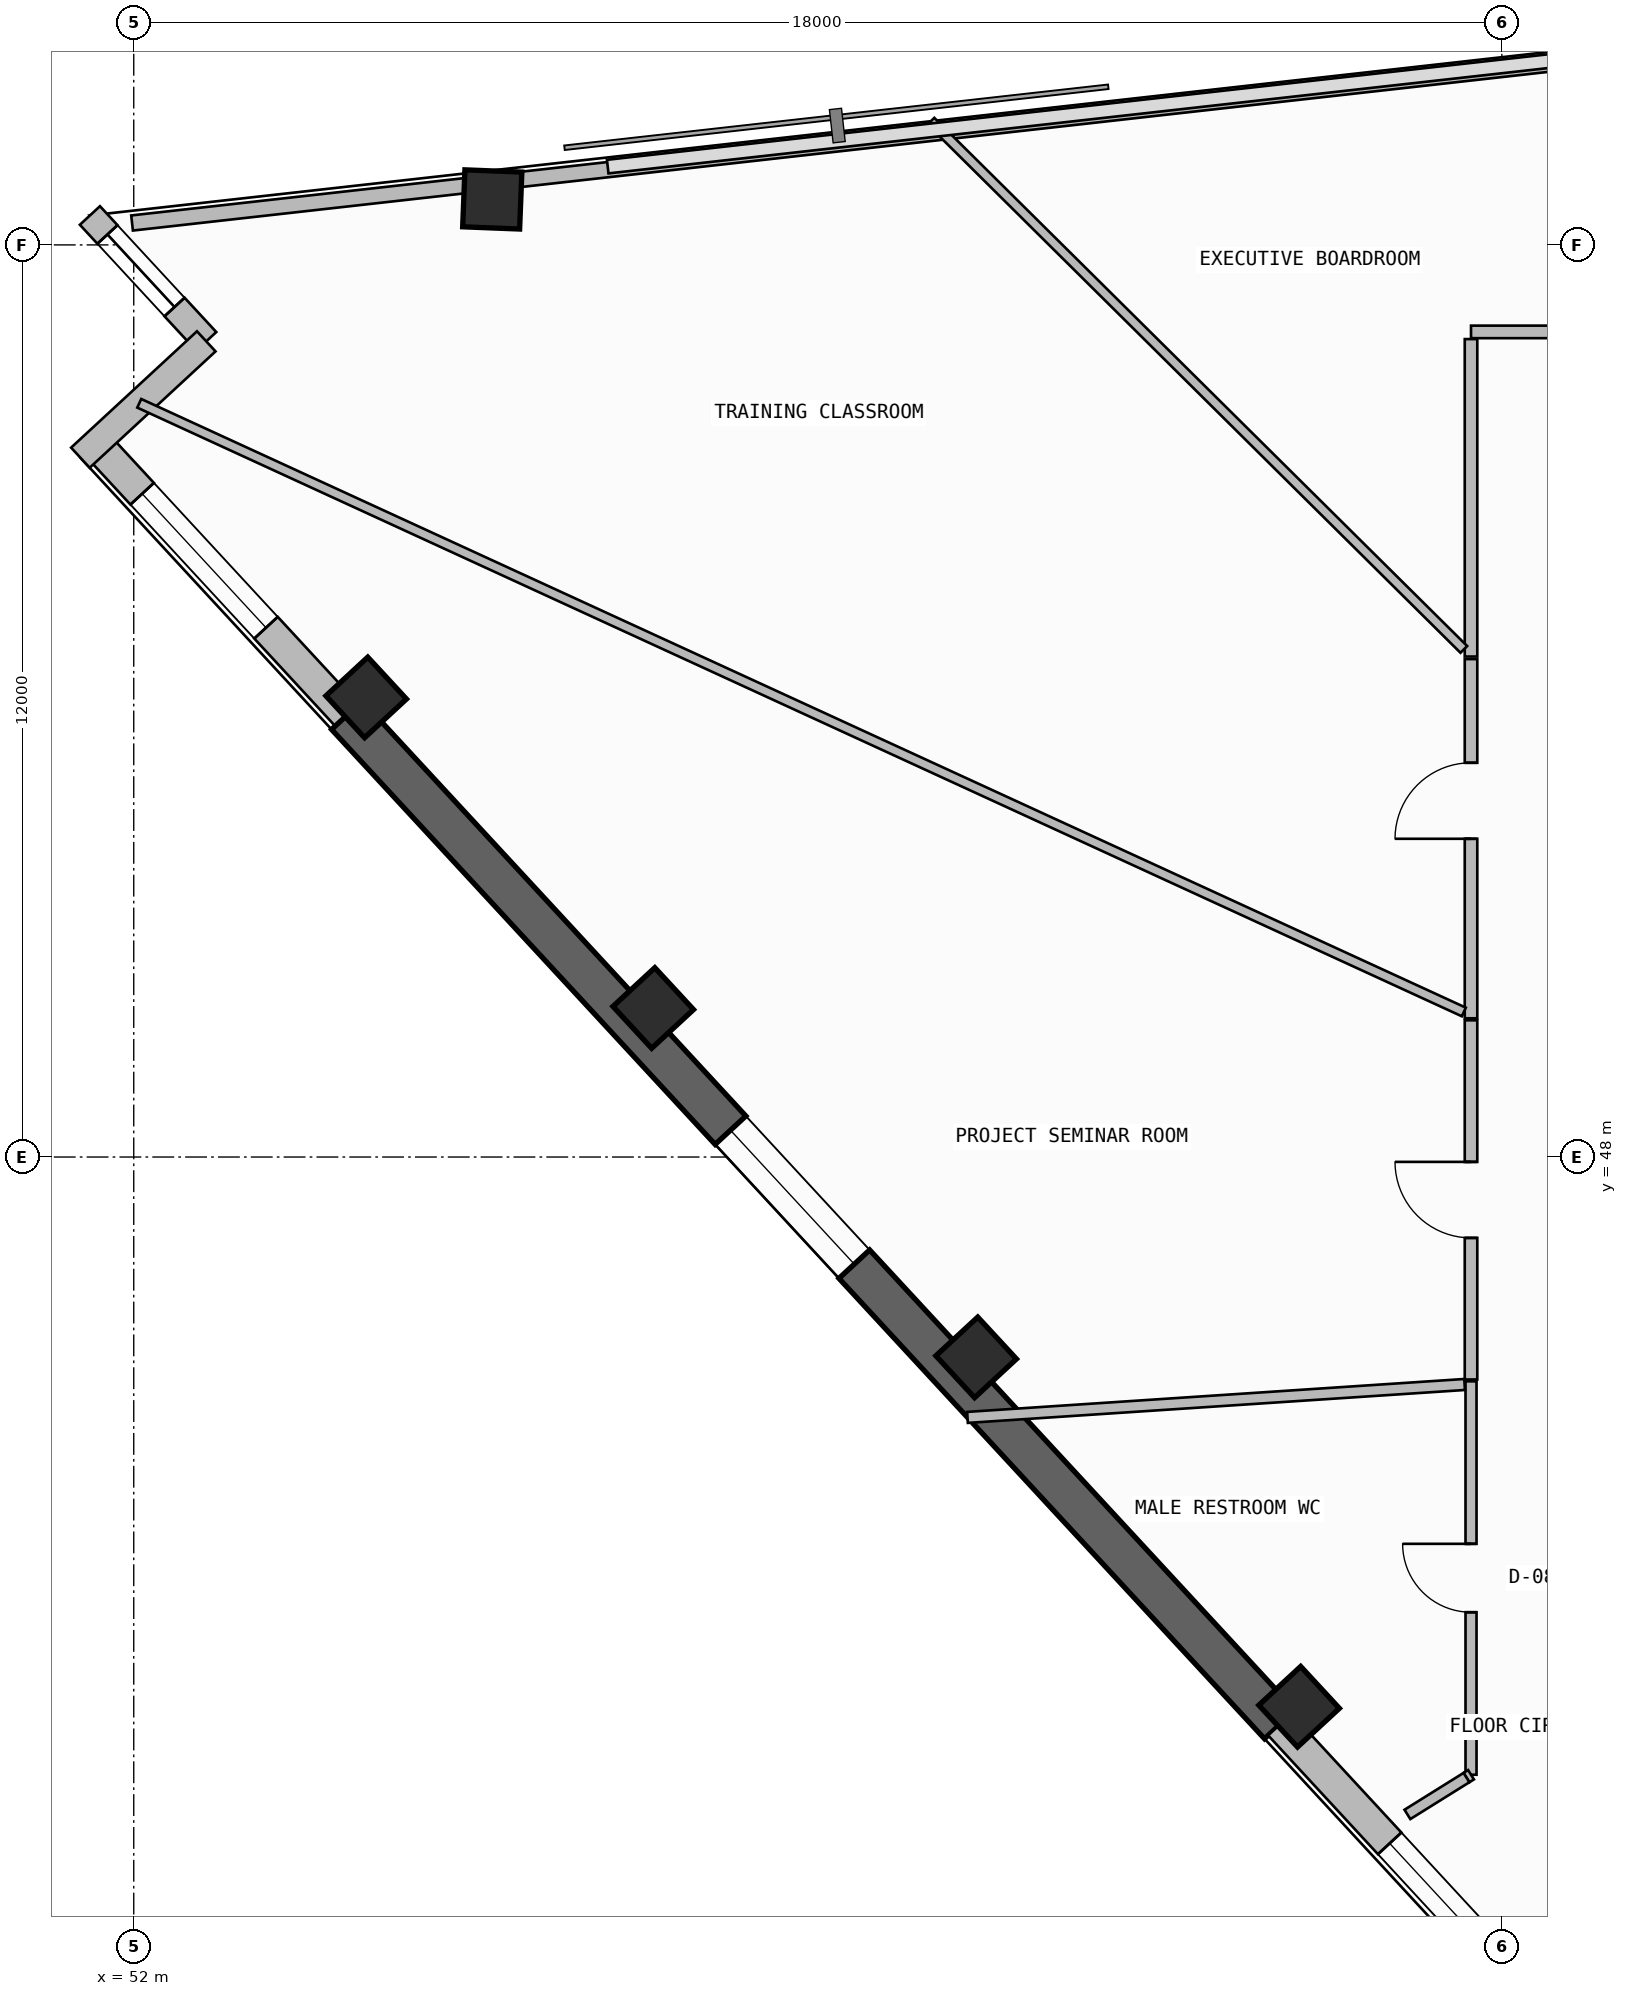
"""IFC4 building model, lengths in metres.
Left out: names, types, materials, properties, quantities, classifications, styles, units other than length and angle.
Written with IfcOpenShell. Run it as: python <this file> out.ifc"""

import sys

from ifc_helpers import new_model, si_unit, direction, frame, frame_2d, origin, origin_2d, place, context, subcontext, project, spatial, rectangle, extrude, element, fill, save


model = new_model("IFC4")
c1 = context("Model", 3, precision=1e-05, world=origin(), true_north=direction((0.0, 1.0)))
c2 = subcontext(c1, "Body", "Model", "MODEL_VIEW")
j1 = project(units=[si_unit("LENGTHUNIT", "METRE"), si_unit("PLANEANGLEUNIT", "RADIAN")], contexts=[c1])
p1 = place(None, origin())
s1 = spatial("IfcSite", under=j1, at=p1, CompositionType="ELEMENT")
p2 = place(p1, origin())
s2 = spatial("IfcBuilding", under=s1, at=p2, CompositionType="ELEMENT")
p3 = place(p2, frame((0.0, 0.0, 264.26)))
s3 = spatial("IfcBuildingStorey", under=s2, at=p3, CompositionType="ELEMENT", Elevation=264.26)
for number, where, z_axis, x_axis in (
    (1, (56.717, 60.598, -0.26), (0.0, 0.0, 1.0), (0.039, 0.999, 0.0)),
    (2, (55.058, 54.046, -0.26), (0.0, 0.0, 1.0), (-0.679, 0.734, 0.0)),
    (3, (58.835, 49.961, -0.26), (0.0, 0.0, 1.0), (-0.679, 0.734, 0.0)),
):
    element("IfcColumn", number, at=place(p3, frame(where, z_axis=z_axis, x_axis=x_axis)), inside=s3, PredefinedType="COLUMN", context=c2, shape_type="SweptSolid", body=[
        extrude(rectangle(XDim=0.75, YDim=0.75, at=origin_2d()), origin(), (0.0, 0.0, 1.0), 3.78),
    ])
for number, where, z_axis, x_axis in (
    (4, (63.084, 45.364, 0.0), (0.0, 0.0, 1.0), (-0.679, 0.734, 0.0)),
    (5, (67.333, 40.768, 0.0), (0.0, 0.0, 1.0), (-0.679, 0.734, 0.0)),
):
    element("IfcColumn", number, at=place(p3, frame(where, z_axis=z_axis, x_axis=x_axis)), inside=s3, PredefinedType="COLUMN", context=c2, shape_type="SweptSolid", body=[
        extrude(rectangle(XDim=0.75, YDim=0.75, at=origin_2d()), origin(), (0.0, 0.0, 1.0), 3.52),
    ])
p4 = place(p3, frame((51.5, 57.387, 0.0), z_axis=(0.0, 0.0, 1.0), x_axis=(0.67880684669, -0.734316869537, 0.0)))
e6 = element("IfcWall", 6, at=p4, inside=s3, PredefinedType="SOLIDWALL", context=c2, shape_type="SweptSolid", body=[
    extrude(rectangle(XDim=4.869, YDim=0.42, at=frame_2d((2.434, 0.0))), origin(), (0.0, 0.0, 1.0), 2.645),
])
p5 = place(p4, frame((0.9, 0.0, 1.1)))
e7 = element("IfcOpeningElement", 7, at=p5, cuts=e6, PredefinedType="OPENING", context=c2, shape_type="SweptSolid", body=[
    extrude(rectangle(XDim=2.4, YDim=1.2, at=frame_2d((1.2, 0.6))), frame((0.0, 0.22, 0.0), z_axis=(0.0, -1.0, 0.0), x_axis=(1.0, 0.0, 0.0)), (0.0, 0.0, 1.0), 0.44),
])
p6 = place(p3, frame((54.805, 53.812, -0.26), z_axis=(0.0, 0.0, 1.0), x_axis=(0.678803115619, -0.734320318543, 0.0)))
e8 = element("IfcWall", 8, at=p6, inside=s3, PredefinedType="SHEAR", context=c2, shape_type="SweptSolid", body=[
    extrude(rectangle(XDim=18.083, YDim=0.55, at=frame_2d((9.042, 0.0))), origin(), (0.0, 0.0, 1.0), 3.52),
])
p7 = place(p6, frame((7.434, 0.0, 1.1)))
e9 = element("IfcOpeningElement", 9, at=p7, cuts=e8, PredefinedType="OPENING", context=c2, shape_type="SweptSolid", body=[
    extrude(rectangle(XDim=2.4, YDim=1.2, at=frame_2d((1.2, 0.6))), frame((0.0, 0.285, 0.0), z_axis=(0.0, -1.0, 0.0), x_axis=(1.0, 0.0, 0.0)), (0.0, 0.0, 1.0), 0.57),
])
p8 = place(p3, frame((67.08, 40.533, 0.0), z_axis=(0.0, 0.0, 1.0), x_axis=(0.678800006437, -0.734323192648, 0.0)))
e10 = element("IfcWall", 10, at=p8, inside=s3, PredefinedType="SOLIDWALL", context=c2, shape_type="SweptSolid", body=[
    extrude(rectangle(XDim=6.512, YDim=0.42, at=frame_2d((3.256, 0.0))), origin(), (0.0, 0.0, 1.0), 2.645),
])
p9 = place(p8, frame((2.129, 0.0, 1.1)))
e11 = element("IfcOpeningElement", 11, at=p9, cuts=e10, PredefinedType="OPENING", context=c2, shape_type="SweptSolid", body=[
    extrude(rectangle(XDim=2.4, YDim=1.2, at=frame_2d((1.2, 0.6))), frame((0.0, 0.22, 0.0), z_axis=(0.0, -1.0, 0.0), x_axis=(1.0, 0.0, 0.0)), (0.0, 0.0, 1.0), 0.44),
])
p10 = place(p3, frame((51.423, 60.387, 0.0), z_axis=(0.0, 0.0, 1.0), x_axis=(0.678792531533, -0.734330102294, 0.0)))
e12 = element("IfcWall", 12, at=p10, inside=s3, PredefinedType="SOLIDWALL", context=c2, shape_type="SweptSolid", body=[
    extrude(rectangle(XDim=2.255, YDim=0.36, at=frame_2d((1.127, 0.0))), origin(), (0.0, 0.0, 1.0), 3.26),
])
p11 = place(p10, frame((0.34, 0.0, 0.45)))
e13 = element("IfcOpeningElement", 13, at=p11, cuts=e12, PredefinedType="OPENING", context=c2, shape_type="SweptSolid", body=[
    extrude(rectangle(XDim=1.3, YDim=2.4, at=frame_2d((0.65, 1.2))), frame((0.0, 0.19, 0.0), z_axis=(0.0, -1.0, 0.0), x_axis=(1.0, 0.0, 0.0)), (0.0, 0.0, 1.0), 0.38),
])
p12 = place(p3, frame((52.954, 58.731, 0.0), z_axis=(0.0, 0.0, 1.0), x_axis=(-0.734330102294, -0.678792531533, 0.0)))
e14 = element("IfcWall", 14, at=p12, inside=s3, PredefinedType="SOLIDWALL", context=c2, shape_type="SweptSolid", body=[
    extrude(rectangle(XDim=2.255, YDim=0.36, at=frame_2d((1.127, 0.0))), origin(), (0.0, 0.0, 1.0), 3.26),
])
p13 = place(p3, frame((81.557, 63.604, 0.0), z_axis=(0.0, 0.0, 1.0), x_axis=(-0.993776455024, -0.111392806945, 0.0)))
e15 = element("IfcWall", 15, at=p13, inside=s3, PredefinedType="PARAPET", context=c2, shape_type="SweptSolid", body=[
    extrude(rectangle(XDim=24.891, YDim=0.2, at=frame_2d((12.446, 0.0))), origin(), (0.0, 0.0, 1.0), 1.15),
])
p14 = place(p3, frame((56.565, 60.802, 0.0), z_axis=(0.0, 0.0, 1.0), x_axis=(-0.99377164586, -0.111435702918, 0.0)))
e16 = element("IfcWall", 16, at=p14, inside=s3, PredefinedType="PARAPET", context=c2, shape_type="SweptSolid", body=[
    extrude(rectangle(XDim=4.616, YDim=0.2, at=frame_2d((2.308, 0.0))), origin(), (0.0, 0.0, 1.0), 1.15),
])
p15 = place(p3, frame((69.594, 45.049, 0.0), z_axis=(0.0, 0.0, 1.0), x_axis=(0.0, -1.0, 0.0)))
e17 = element("IfcWall", 17, at=p15, inside=s3, PredefinedType="PARTITIONING", context=c2, shape_type="SweptSolid", body=[
    extrude(rectangle(XDim=5.176, YDim=0.145, at=frame_2d((2.588, 0.0))), origin(), (0.0, 0.0, 1.0), 3.26),
])
p16 = place(p15, frame((2.138, 0.0, 0.0)))
e18 = element("IfcOpeningElement", 18, at=p16, cuts=e17, PredefinedType="OPENING", context=c2, shape_type="SweptSolid", body=[
    extrude(rectangle(XDim=0.9, YDim=2.1, at=frame_2d((0.45, 1.05))), frame((0.0, 0.083, 0.0), z_axis=(0.0, -1.0, 0.0), x_axis=(1.0, 0.0, 0.0)), (0.0, 0.0, 1.0), 0.165),
])
p17 = place(p3, frame((69.594, 39.873, 0.0), z_axis=(0.0, 0.0, 1.0), x_axis=(-0.848192741916, -0.529687712299, 0.0)))
e19 = element("IfcWall", 19, at=p17, inside=s3, PredefinedType="PARTITIONING", context=c2, shape_type="SweptSolid", body=[
    extrude(rectangle(XDim=0.071, YDim=0.145, at=frame_2d((0.035, 0.0))), origin(), (0.0, 0.0, 1.0), 3.26),
])
p18 = place(p3, frame((62.969, 44.574, 0.0), z_axis=(0.0, 0.0, 1.0), x_axis=(0.997814723426, 0.066074032078, 0.0)))
e20 = element("IfcWall", 20, at=p18, inside=s3, PredefinedType="PARTITIONING", context=c2, shape_type="SweptSolid", body=[
    extrude(rectangle(XDim=6.555, YDim=0.145, at=frame_2d((3.277, 0.0))), origin(), (0.0, 0.0, 1.0), 2.645),
])
p19 = place(p3, frame((77.35, 58.855, 0.0), z_axis=(0.0, 0.0, 1.0), x_axis=(-1.0, 0.0, 0.0)))
e21 = element("IfcWall", 21, at=p19, inside=s3, PredefinedType="PARTITIONING", context=c2, shape_type="SweptSolid", body=[
    extrude(rectangle(XDim=7.756, YDim=0.165, at=frame_2d((3.878, 0.0))), origin(), (0.0, 0.0, 1.0), 3.26),
])
p20 = place(p19, frame((1.598, 0.0, 0.0)))
e22 = element("IfcOpeningElement", 22, at=p20, cuts=e21, PredefinedType="OPENING", context=c2, shape_type="SweptSolid", body=[
    extrude(rectangle(XDim=1.0, YDim=2.2, at=frame_2d((0.5, 1.1))), frame((0.0, 0.093, 0.0), z_axis=(0.0, -1.0, 0.0), x_axis=(1.0, 0.0, 0.0)), (0.0, 0.0, 1.0), 0.185),
])
p21 = place(p3, frame((69.594, 58.761, 0.0), z_axis=(0.0, 0.0, 1.0), x_axis=(0.0, -1.0, 0.0)))
e23 = element("IfcWall", 23, at=p21, inside=s3, PredefinedType="PARTITIONING", context=c2, shape_type="SweptSolid", body=[
    extrude(rectangle(XDim=4.177, YDim=0.165, at=frame_2d((2.088, 0.0))), origin(), (0.0, 0.0, 1.0), 2.745),
])
p22 = place(p3, frame((69.5, 54.678, 0.0), z_axis=(0.0, 0.0, 1.0), x_axis=(-0.710216090799, 0.703983738712, 0.0)))
e24 = element("IfcWall", 24, at=p22, inside=s3, PredefinedType="PARTITIONING", context=c2, shape_type="SweptSolid", body=[
    extrude(rectangle(XDim=9.872, YDim=0.125, at=frame_2d((4.936, 0.0))), origin(), (0.0, 0.0, 1.0), 2.745),
])
p23 = place(p3, frame((69.594, 54.551, 0.0), z_axis=(0.0, 0.0, 1.0), x_axis=(0.0, -1.0, 0.0)))
e25 = element("IfcWall", 25, at=p23, inside=s3, PredefinedType="PARTITIONING", context=c2, shape_type="SweptSolid", body=[
    extrude(rectangle(XDim=4.726, YDim=0.165, at=frame_2d((2.363, 0.0))), origin(), (0.0, 0.0, 1.0), 2.745),
])
p24 = place(p23, frame((1.364, 0.0, 0.0)))
e26 = element("IfcOpeningElement", 26, at=p24, cuts=e25, PredefinedType="OPENING", context=c2, shape_type="SweptSolid", body=[
    extrude(rectangle(XDim=1.0, YDim=2.2, at=frame_2d((0.5, 1.1))), frame((0.0, 0.093, 0.0), z_axis=(0.0, -1.0, 0.0), x_axis=(1.0, 0.0, 0.0)), (0.0, 0.0, 1.0), 0.185),
])
p25 = place(p3, frame((69.5, 49.908, 0.0), z_axis=(0.0, 0.0, 1.0), x_axis=(-0.90866039796, 0.417535963934, 0.0)))
e27 = element("IfcWall", 27, at=p25, inside=s3, PredefinedType="PARTITIONING", context=c2, shape_type="SweptSolid", body=[
    extrude(rectangle(XDim=19.179, YDim=0.125, at=frame_2d((9.59, 0.0))), origin(), (0.0, 0.0, 1.0), 2.645),
])
p26 = place(p3, frame((69.594, 49.799, 0.0), z_axis=(0.0, 0.0, 1.0), x_axis=(0.0, -1.0, 0.0)))
e28 = element("IfcWall", 28, at=p26, inside=s3, PredefinedType="PARTITIONING", context=c2, shape_type="SweptSolid", body=[
    extrude(rectangle(XDim=4.726, YDim=0.165, at=frame_2d((2.363, 0.0))), origin(), (0.0, 0.0, 1.0), 3.26),
])
p27 = place(p26, frame((1.863, 0.0, 0.0)))
e29 = element("IfcOpeningElement", 29, at=p27, cuts=e28, PredefinedType="OPENING", context=c2, shape_type="SweptSolid", body=[
    extrude(rectangle(XDim=1.0, YDim=2.2, at=frame_2d((0.5, 1.1))), frame((0.0, 0.093, 0.0), z_axis=(0.0, -1.0, 0.0), x_axis=(1.0, 0.0, 0.0)), (0.0, 0.0, 1.0), 0.185),
])
p28 = place(p3, frame((69.535, 39.836, 0.0), z_axis=(0.0, 0.0, 1.0), x_axis=(-0.848567125835, -0.529087736536, 0.0)))
e30 = element("IfcWall", 30, at=p28, inside=s3, PredefinedType="PARTITIONING", context=c2, shape_type="SweptSolid", body=[
    extrude(rectangle(XDim=0.916, YDim=0.145, at=frame_2d((0.458, 0.0))), origin(), (0.0, 0.0, 1.0), 3.26),
])
p29 = place(p5, origin())
e31 = element("IfcWindow", 31, at=p29, inside=s3, PartitioningType="SINGLE_PANEL", PredefinedType="WINDOW", context=c2, shape_type="SweptSolid", body=[
    extrude(rectangle(XDim=2.4, YDim=1.2, at=frame_2d((1.2, 0.6))), frame((0.0, 0.03, 0.0), z_axis=(0.0, -1.0, 0.0), x_axis=(1.0, 0.0, 0.0)), (0.0, 0.0, 1.0), 0.06),
])
fill(e7, e31)
p30 = place(p7, origin())
e32 = element("IfcWindow", 32, at=p30, inside=s3, PartitioningType="SINGLE_PANEL", PredefinedType="WINDOW", context=c2, shape_type="SweptSolid", body=[
    extrude(rectangle(XDim=2.4, YDim=1.2, at=frame_2d((1.2, 0.6))), frame((0.0, 0.03, 0.0), z_axis=(0.0, -1.0, 0.0), x_axis=(1.0, 0.0, 0.0)), (0.0, 0.0, 1.0), 0.06),
])
fill(e9, e32)
p31 = place(p9, origin())
e33 = element("IfcWindow", 33, at=p31, inside=s3, PartitioningType="SINGLE_PANEL", PredefinedType="WINDOW", context=c2, shape_type="SweptSolid", body=[
    extrude(rectangle(XDim=2.4, YDim=1.2, at=frame_2d((1.2, 0.6))), frame((0.0, 0.03, 0.0), z_axis=(0.0, -1.0, 0.0), x_axis=(1.0, 0.0, 0.0)), (0.0, 0.0, 1.0), 0.06),
])
fill(e11, e33)
p32 = place(p11, origin())
e34 = element("IfcWindow", 34, at=p32, inside=s3, PartitioningType="SINGLE_PANEL", PredefinedType="WINDOW", context=c2, shape_type="SweptSolid", body=[
    extrude(rectangle(XDim=1.3, YDim=2.4, at=frame_2d((0.65, 1.2))), frame((0.0, 0.03, 0.0), z_axis=(0.0, -1.0, 0.0), x_axis=(1.0, 0.0, 0.0)), (0.0, 0.0, 1.0), 0.06),
])
fill(e13, e34)
p33 = place(p16, frame((0.9, 0.0, 0.0), z_axis=(0.0, 0.0, 1.0), x_axis=(-1.0, 0.0, 0.0)))
e35 = element("IfcDoor", 35, at=p33, inside=s3, OperationType="SINGLE_SWING_RIGHT", PredefinedType="DOOR", context=c2, shape_type="SweptSolid", body=[
    extrude(rectangle(XDim=0.9, YDim=2.1, at=frame_2d((0.45, 1.05))), frame((0.0, 0.025, 0.0), z_axis=(0.0, -1.0, 0.0), x_axis=(1.0, 0.0, 0.0)), (0.0, 0.0, 1.0), 0.05),
])
fill(e18, e35)
p34 = place(p24, frame((1.0, 0.0, 0.0), z_axis=(0.0, 0.0, 1.0), x_axis=(-1.0, 0.0, 0.0)))
e36 = element("IfcDoor", 36, at=p34, inside=s3, OperationType="SINGLE_SWING_LEFT", PredefinedType="DOOR", context=c2, shape_type="SweptSolid", body=[
    extrude(rectangle(XDim=1.0, YDim=2.2, at=frame_2d((0.5, 1.1))), frame((0.0, 0.025, 0.0), z_axis=(0.0, -1.0, 0.0), x_axis=(1.0, 0.0, 0.0)), (0.0, 0.0, 1.0), 0.05),
])
fill(e26, e36)
p35 = place(p27, frame((1.0, 0.0, 0.0), z_axis=(0.0, 0.0, 1.0), x_axis=(-1.0, 0.0, 0.0)))
e37 = element("IfcDoor", 37, at=p35, inside=s3, OperationType="SINGLE_SWING_RIGHT", PredefinedType="DOOR", context=c2, shape_type="SweptSolid", body=[
    extrude(rectangle(XDim=1.0, YDim=2.2, at=frame_2d((0.5, 1.1))), frame((0.0, 0.025, 0.0), z_axis=(0.0, -1.0, 0.0), x_axis=(1.0, 0.0, 0.0)), (0.0, 0.0, 1.0), 0.05),
])
fill(e29, e37)
save(model, sys.argv[1])
